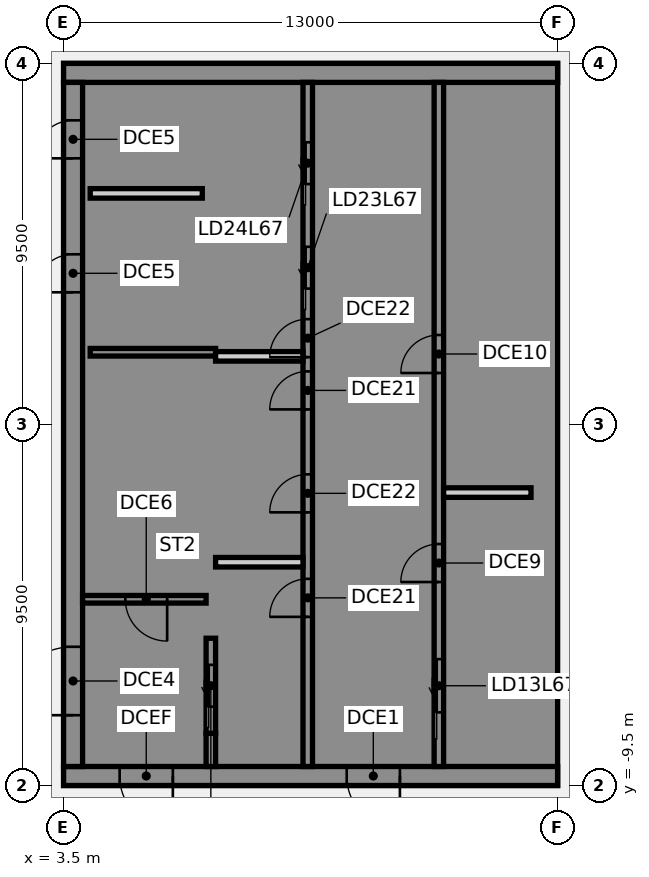
"""IFC4 building model, lengths in metres.
Left out: names, types, materials, properties, quantities, classifications, styles, units other than length and angle.
Written with IfcOpenShell. Run it as: python <this file> out.ifc"""

import sys

from ifc_helpers import new_model, si_unit, direction, frame, frame_2d, origin, place, context, subcontext, project, spatial, polyline, rectangle, outline, extrude, element, fill, save


model = new_model("IFC4")
c1 = context("Model", 3, precision=1e-05, world=origin(), true_north=direction((0.0, 1.0)))
c2 = subcontext(c1, "Body", "Model", "MODEL_VIEW")
j1 = project(units=[si_unit("LENGTHUNIT", "METRE"), si_unit("PLANEANGLEUNIT", "RADIAN")], contexts=[c1])
p1 = place(None, origin())
s1 = spatial("IfcSite", under=j1, at=p1, CompositionType="ELEMENT")
p2 = place(p1, origin())
s2 = spatial("IfcBuilding", under=s1, at=p2, CompositionType="ELEMENT")
p3 = place(p2, frame((0.0, 0.0, 264.0)))
s3 = spatial("IfcBuildingStorey", under=s2, at=p3, CompositionType="ELEMENT", Elevation=264.0)
p4 = place(p3, frame((16.5, -9.25, 0.0), z_axis=(0.0, 0.0, 1.0), x_axis=(-1.0, 0.0, 0.0)))
e1 = element("IfcWall", 1, at=p4, inside=s3, PredefinedType="SHEAR", context=c2, shape_type="SweptSolid", body=[
    extrude(rectangle(XDim=13.0, YDim=0.5, at=frame_2d((6.5, 0.0))), origin(), (0.0, 0.0, 1.0), 3.46),
])
p5 = place(p4, frame((4.15, 0.0, 0.0)))
e2 = element("IfcOpeningElement", 2, at=p5, cuts=e1, PredefinedType="OPENING", context=c2, shape_type="SweptSolid", body=[
    extrude(rectangle(XDim=1.4, YDim=2.1, at=frame_2d((0.7, 1.05))), frame((0.0, 0.26, 0.0), z_axis=(0.0, -1.0, 0.0), x_axis=(1.0, 0.0, 0.0)), (0.0, 0.0, 1.0), 0.52),
])
p6 = place(p4, frame((10.125, 0.0, 0.0)))
e3 = element("IfcOpeningElement", 3, at=p6, cuts=e1, PredefinedType="OPENING", context=c2, shape_type="SweptSolid", body=[
    extrude(rectangle(XDim=1.4, YDim=2.1, at=frame_2d((0.7, 1.05))), frame((0.0, 0.26, 0.0), z_axis=(0.0, -1.0, 0.0), x_axis=(1.0, 0.0, 0.0)), (0.0, 0.0, 1.0), 0.52),
])
p7 = place(p3, origin())
e4 = element("IfcWall", 4, at=p7, inside=s3, PredefinedType="SHEAR", context=c2, shape_type="SweptSolid", body=[
    extrude(outline(polyline([(13.5, -8.125), (13.5, -9.0), (16.0, -9.0), (16.5, -9.0), (16.5, 9.0), (16.0, 9.0), (13.5, 9.0), (13.5, 8.125), (16.0, 8.125), (16.0, 5.625), (13.5, 5.625), (13.5, 5.375), (16.0, 5.375), (16.0, -5.375), (13.5, -5.375), (13.5, -5.625), (16.0, -5.625), (16.0, -8.125), (13.5, -8.125)])), origin(), (0.0, 0.0, 1.0), 3.46),
])
p8 = place(p3, frame((16.5, 9.25, 0.0), z_axis=(0.0, 0.0, 1.0), x_axis=(-1.0, 0.0, 0.0)))
e5 = element("IfcWall", 5, at=p8, inside=s3, PredefinedType="SHEAR", context=c2, shape_type="SweptSolid", body=[
    extrude(rectangle(XDim=13.0, YDim=0.5, at=frame_2d((6.5, 0.0))), origin(), (0.0, 0.0, 1.0), 3.46),
])
p9 = place(p3, origin())
e6 = element("IfcWall", 6, at=p9, inside=s3, PredefinedType="SHEAR", context=c2, shape_type="SweptSolid", body=[
    extrude(outline(polyline([(9.8, -5.375), (7.5, -5.375), (7.5, 2.625), (9.8, 2.625), (9.8, 2.875), (7.5, 2.875), (7.5, 5.375), (9.8, 5.375), (9.8, 5.625), (7.5, 5.625), (7.5, 8.125), (9.8, 8.125), (9.8, 9.0), (7.5, 9.0), (7.25, 9.0), (7.25, -5.625), (7.5, -5.625), (9.8, -5.625), (9.8, -5.375)])), origin(), (0.0, 0.0, 1.0), 3.46),
])
p10 = place(p3, origin())
e7 = element("IfcWall", 7, at=p10, inside=s3, PredefinedType="SHEAR", context=c2, shape_type="SweptSolid", body=[
    extrude(outline(polyline([(7.5, -8.125), (7.5, -9.0), (9.8, -9.0), (9.8, -8.125), (9.8, -5.625), (9.55, -5.625), (9.55, -8.125), (7.5, -8.125)])), origin(), (0.0, 0.0, 1.0), 3.46),
])
p11 = place(p3, frame((7.375, -9.0, 0.0), z_axis=(0.0, 0.0, 1.0), x_axis=(0.0, 1.0, 0.0)))
e8 = element("IfcWall", 8, at=p11, inside=s3, PredefinedType="SHEAR", context=c2, shape_type="SweptSolid", body=[
    extrude(rectangle(XDim=0.875, YDim=0.25, at=frame_2d((0.438, 0.0))), origin(), (0.0, 0.0, 1.0), 3.46),
])
p12 = place(p3, frame((7.5, 1.9, 0.0), z_axis=(0.0, 0.0, 1.0), x_axis=(-1.0, 0.0, 0.0)))
e9 = element("IfcWall", 9, at=p12, inside=s3, PredefinedType="SHEAR", context=c2, shape_type="SweptSolid", body=[
    extrude(rectangle(XDim=3.3, YDim=0.2, at=frame_2d((1.65, 0.0))), origin(), (0.0, 0.0, 1.0), 3.46),
])
p13 = place(p3, frame((13.375, -9.0, 0.0), z_axis=(0.0, 0.0, 1.0), x_axis=(0.0, 1.0, 0.0)))
e10 = element("IfcWall", 10, at=p13, inside=s3, PredefinedType="SHEAR", context=c2, shape_type="SweptSolid", body=[
    extrude(rectangle(XDim=18.0, YDim=0.25, at=frame_2d((9.0, 0.0))), origin(), (0.0, 0.0, 1.0), 3.46),
])
p14 = place(p13, frame((1.425, 0.0, 0.0)))
e11 = element("IfcOpeningElement", 11, at=p14, cuts=e10, PredefinedType="OPENING", context=c2, shape_type="SweptSolid", body=[
    extrude(rectangle(XDim=1.4, YDim=2.1, at=frame_2d((0.7, 1.05))), frame((0.0, 0.135, 0.0), z_axis=(0.0, -1.0, 0.0), x_axis=(1.0, 0.0, 0.0)), (0.0, 0.0, 1.0), 0.27),
])
p15 = place(p13, frame((4.854, 0.0, 0.0)))
e12 = element("IfcOpeningElement", 12, at=p15, cuts=e10, PredefinedType="OPENING", context=c2, shape_type="SweptSolid", body=[
    extrude(rectangle(XDim=1.0, YDim=2.1, at=frame_2d((0.5, 1.05))), frame((0.0, 0.135, 0.0), z_axis=(0.0, -1.0, 0.0), x_axis=(1.0, 0.0, 0.0)), (0.0, 0.0, 1.0), 0.27),
])
p16 = place(p13, frame((10.354, 0.0, 0.0)))
e13 = element("IfcOpeningElement", 13, at=p16, cuts=e10, PredefinedType="OPENING", context=c2, shape_type="SweptSolid", body=[
    extrude(rectangle(XDim=1.0, YDim=2.1, at=frame_2d((0.5, 1.05))), frame((0.0, 0.135, 0.0), z_axis=(0.0, -1.0, 0.0), x_axis=(1.0, 0.0, 0.0)), (0.0, 0.0, 1.0), 0.27),
])
p17 = place(p3, frame((9.925, -9.0, 0.0), z_axis=(0.0, 0.0, 1.0), x_axis=(0.0, 1.0, 0.0)))
e14 = element("IfcWall", 14, at=p17, inside=s3, PredefinedType="SHEAR", context=c2, shape_type="SweptSolid", body=[
    extrude(rectangle(XDim=18.0, YDim=0.25, at=frame_2d((9.0, 0.0))), origin(), (0.0, 0.0, 1.0), 3.46),
])
p18 = place(p17, frame((12.575, 0.0, 0.0)))
e15 = element("IfcOpeningElement", 15, at=p18, cuts=e14, PredefinedType="OPENING", context=c2, shape_type="SweptSolid", body=[
    extrude(rectangle(XDim=1.1, YDim=2.1, at=frame_2d((0.55, 1.05))), frame((0.0, 0.135, 0.0), z_axis=(0.0, -1.0, 0.0), x_axis=(1.0, 0.0, 0.0)), (0.0, 0.0, 1.0), 0.27),
])
p19 = place(p17, frame((15.325, 0.0, 0.0)))
e16 = element("IfcOpeningElement", 16, at=p19, cuts=e14, PredefinedType="OPENING", context=c2, shape_type="SweptSolid", body=[
    extrude(rectangle(XDim=1.1, YDim=2.1, at=frame_2d((0.55, 1.05))), frame((0.0, 0.135, 0.0), z_axis=(0.0, -1.0, 0.0), x_axis=(1.0, 0.0, 0.0)), (0.0, 0.0, 1.0), 0.27),
])
p20 = place(p17, frame((3.938, 0.0, 0.0)))
e17 = element("IfcOpeningElement", 17, at=p20, cuts=e14, PredefinedType="OPENING", context=c2, shape_type="SweptSolid", body=[
    extrude(rectangle(XDim=1.0, YDim=2.1, at=frame_2d((0.5, 1.05))), frame((0.0, 0.135, 0.0), z_axis=(0.0, -1.0, 0.0), x_axis=(1.0, 0.0, 0.0)), (0.0, 0.0, 1.0), 0.27),
])
p21 = place(p17, frame((6.688, 0.0, 0.0)))
e18 = element("IfcOpeningElement", 18, at=p21, cuts=e14, PredefinedType="OPENING", context=c2, shape_type="SweptSolid", body=[
    extrude(rectangle(XDim=1.0, YDim=2.1, at=frame_2d((0.5, 1.05))), frame((0.0, 0.135, 0.0), z_axis=(0.0, -1.0, 0.0), x_axis=(1.0, 0.0, 0.0)), (0.0, 0.0, 1.0), 0.27),
])
p22 = place(p17, frame((9.396, 0.0, 0.0)))
e19 = element("IfcOpeningElement", 19, at=p22, cuts=e14, PredefinedType="OPENING", context=c2, shape_type="SweptSolid", body=[
    extrude(rectangle(XDim=1.0, YDim=2.1, at=frame_2d((0.5, 1.05))), frame((0.0, 0.135, 0.0), z_axis=(0.0, -1.0, 0.0), x_axis=(1.0, 0.0, 0.0)), (0.0, 0.0, 1.0), 0.27),
])
p23 = place(p17, frame((10.771, 0.0, 0.0)))
e20 = element("IfcOpeningElement", 20, at=p23, cuts=e14, PredefinedType="OPENING", context=c2, shape_type="SweptSolid", body=[
    extrude(rectangle(XDim=1.0, YDim=2.1, at=frame_2d((0.5, 1.05))), frame((0.0, 0.135, 0.0), z_axis=(0.0, -1.0, 0.0), x_axis=(1.0, 0.0, 0.0)), (0.0, 0.0, 1.0), 0.27),
])
p24 = place(p3, frame((7.375, -8.125, 0.0), z_axis=(0.0, 0.0, 1.0), x_axis=(0.0, 1.0, 0.0)))
e21 = element("IfcWall", 21, at=p24, inside=s3, PredefinedType="SHEAR", context=c2, shape_type="SweptSolid", body=[
    extrude(rectangle(XDim=2.5, YDim=0.25, at=frame_2d((1.25, 0.0))), origin(), (0.0, 0.0, 1.0), 3.46),
])
p25 = place(p24, frame((0.7, 0.0, 0.0)))
e22 = element("IfcOpeningElement", 22, at=p25, cuts=e21, PredefinedType="OPENING", context=c2, shape_type="SweptSolid", body=[
    extrude(rectangle(XDim=1.1, YDim=2.1, at=frame_2d((0.55, 1.05))), frame((0.0, 0.135, 0.0), z_axis=(0.0, -1.0, 0.0), x_axis=(1.0, 0.0, 0.0)), (0.0, 0.0, 1.0), 0.27),
])
p26 = place(p3, frame((3.75, -9.0, 0.0), z_axis=(0.0, 0.0, 1.0), x_axis=(0.0, 1.0, 0.0)))
e23 = element("IfcWall", 23, at=p26, inside=s3, PredefinedType="SHEAR", context=c2, shape_type="SweptSolid", body=[
    extrude(rectangle(XDim=18.0, YDim=0.5, at=frame_2d((9.0, 0.0))), origin(), (0.0, 0.0, 1.0), 3.46),
])
p27 = place(p26, frame((1.35, 0.0, 0.0)))
e24 = element("IfcOpeningElement", 24, at=p27, cuts=e23, PredefinedType="OPENING", context=c2, shape_type="SweptSolid", body=[
    extrude(rectangle(XDim=1.8, YDim=2.1, at=frame_2d((0.9, 1.05))), frame((0.0, 0.26, 0.0), z_axis=(0.0, -1.0, 0.0), x_axis=(1.0, 0.0, 0.0)), (0.0, 0.0, 1.0), 0.52),
])
p28 = place(p26, frame((12.478, 0.0, 0.0)))
e25 = element("IfcOpeningElement", 25, at=p28, cuts=e23, PredefinedType="OPENING", context=c2, shape_type="SweptSolid", body=[
    extrude(rectangle(XDim=1.0, YDim=2.1, at=frame_2d((0.5, 1.05))), frame((0.0, 0.26, 0.0), z_axis=(0.0, -1.0, 0.0), x_axis=(1.0, 0.0, 0.0)), (0.0, 0.0, 1.0), 0.52),
])
p29 = place(p26, frame((16.002, 0.0, 0.0)))
e26 = element("IfcOpeningElement", 26, at=p29, cuts=e23, PredefinedType="OPENING", context=c2, shape_type="SweptSolid", body=[
    extrude(rectangle(XDim=1.0, YDim=2.1, at=frame_2d((0.5, 1.05))), frame((0.0, 0.26, 0.0), z_axis=(0.0, -1.0, 0.0), x_axis=(1.0, 0.0, 0.0)), (0.0, 0.0, 1.0), 0.52),
])
p30 = place(p3, frame((7.15, 6.08, 0.0), z_axis=(0.0, 0.0, 1.0), x_axis=(-1.0, 0.0, 0.0)))
e27 = element("IfcWall", 27, at=p30, inside=s3, PredefinedType="PARTITIONING", context=c2, shape_type="SweptSolid", body=[
    extrude(rectangle(XDim=2.95, YDim=0.25, at=frame_2d((1.475, 0.0))), origin(), (0.0, 0.0, 1.0), 3.46),
])
p31 = place(p3, frame((7.25, -4.6, 0.0), z_axis=(0.0, 0.0, 1.0), x_axis=(-1.0, 0.0, 0.0)))
e28 = element("IfcWall", 28, at=p31, inside=s3, PredefinedType="SHEAR", context=c2, shape_type="SweptSolid", body=[
    extrude(rectangle(XDim=3.25, YDim=0.2, at=frame_2d((1.625, 0.0))), origin(), (0.0, 0.0, 1.0), 3.46),
])
p32 = place(p31, frame((1.025, 0.0, 0.0)))
e29 = element("IfcOpeningElement", 29, at=p32, cuts=e28, PredefinedType="OPENING", context=c2, shape_type="SweptSolid", body=[
    extrude(rectangle(XDim=1.1, YDim=2.1, at=frame_2d((0.55, 1.05))), frame((0.0, 0.11, 0.0), z_axis=(0.0, -1.0, 0.0), x_axis=(1.0, 0.0, 0.0)), (0.0, 0.0, 1.0), 0.22),
])
for number, where, z_axis, x_axis in (
    (30, (15.8, -1.792, 0.0), (0.0, 0.0, 1.0), (-1.0, 0.0, 0.0)),
    (31, (9.8, -3.625, 0.0), (0.0, 0.0, 1.0), (-1.0, 0.0, 0.0)),
    (32, (9.8, 1.792, 0.0), (0.0, 0.0, 1.0), (-1.0, 0.0, 0.0)),
):
    element("IfcWall", number, at=place(p3, frame(where, z_axis=z_axis, x_axis=x_axis)), inside=s3, PredefinedType="PARTITIONING", context=c2, shape_type="SweptSolid", body=[
        extrude(rectangle(XDim=2.3, YDim=0.25, at=frame_2d((1.15, 0.0))), origin(), (0.0, 0.0, 1.0), 3.46),
    ])
p33 = place(p5, origin())
e33 = element("IfcDoor", 33, at=p33, inside=s3, OperationType="SINGLE_SWING_LEFT", PredefinedType="DOOR", context=c2, shape_type="SweptSolid", body=[
    extrude(rectangle(XDim=1.4, YDim=2.1, at=frame_2d((0.7, 1.05))), frame((0.0, 0.025, 0.0), z_axis=(0.0, -1.0, 0.0), x_axis=(1.0, 0.0, 0.0)), (0.0, 0.0, 1.0), 0.05),
])
fill(e2, e33)
p34 = place(p6, origin())
e34 = element("IfcDoor", 34, at=p34, inside=s3, OperationType="SINGLE_SWING_LEFT", PredefinedType="DOOR", context=c2, shape_type="SweptSolid", body=[
    extrude(rectangle(XDim=1.4, YDim=2.1, at=frame_2d((0.7, 1.05))), frame((0.0, 0.025, 0.0), z_axis=(0.0, -1.0, 0.0), x_axis=(1.0, 0.0, 0.0)), (0.0, 0.0, 1.0), 0.05),
])
fill(e3, e34)
p35 = place(p27, origin())
e35 = element("IfcDoor", 35, at=p35, inside=s3, OperationType="SINGLE_SWING_LEFT", PredefinedType="DOOR", context=c2, shape_type="SweptSolid", body=[
    extrude(rectangle(XDim=1.8, YDim=2.1, at=frame_2d((0.9, 1.05))), frame((0.0, 0.025, 0.0), z_axis=(0.0, -1.0, 0.0), x_axis=(1.0, 0.0, 0.0)), (0.0, 0.0, 1.0), 0.05),
])
fill(e24, e35)
p36 = place(p28, origin())
e36 = element("IfcDoor", 36, at=p36, inside=s3, OperationType="SINGLE_SWING_LEFT", PredefinedType="DOOR", context=c2, shape_type="SweptSolid", body=[
    extrude(rectangle(XDim=1.0, YDim=2.1, at=frame_2d((0.5, 1.05))), frame((0.0, -0.175, 0.0), z_axis=(0.0, -1.0, 0.0), x_axis=(1.0, 0.0, 0.0)), (0.0, 0.0, 1.0), 0.05),
])
fill(e25, e36)
p37 = place(p29, origin())
e37 = element("IfcDoor", 37, at=p37, inside=s3, OperationType="SINGLE_SWING_LEFT", PredefinedType="DOOR", context=c2, shape_type="SweptSolid", body=[
    extrude(rectangle(XDim=1.0, YDim=2.1, at=frame_2d((0.5, 1.05))), frame((0.0, -0.175, 0.0), z_axis=(0.0, -1.0, 0.0), x_axis=(1.0, 0.0, 0.0)), (0.0, 0.0, 1.0), 0.05),
])
fill(e26, e37)
p38 = place(p32, origin())
e38 = element("IfcDoor", 38, at=p38, inside=s3, OperationType="SINGLE_SWING_LEFT", PredefinedType="DOOR", context=c2, shape_type="SweptSolid", body=[
    extrude(rectangle(XDim=1.1, YDim=2.1, at=frame_2d((0.55, 1.05))), frame((0.0, 0.025, 0.0), z_axis=(0.0, -1.0, 0.0), x_axis=(1.0, 0.0, 0.0)), (0.0, 0.0, 1.0), 0.05),
])
fill(e29, e38)
p39 = place(p14, origin())
e39 = element("IfcDoor", 39, at=p39, inside=s3, OperationType="SLIDING_TO_LEFT", PredefinedType="DOOR", context=c2, shape_type="SweptSolid", body=[
    extrude(rectangle(XDim=1.4, YDim=2.1, at=frame_2d((0.7, 1.05))), frame((0.0, 0.025, 0.0), z_axis=(0.0, -1.0, 0.0), x_axis=(1.0, 0.0, 0.0)), (0.0, 0.0, 1.0), 0.05),
])
fill(e11, e39)
p40 = place(p25, origin())
e40 = element("IfcDoor", 40, at=p40, inside=s3, OperationType="SLIDING_TO_LEFT", PredefinedType="DOOR", context=c2, shape_type="SweptSolid", body=[
    extrude(rectangle(XDim=1.1, YDim=2.1, at=frame_2d((0.55, 1.05))), frame((0.0, 0.025, 0.0), z_axis=(0.0, -1.0, 0.0), x_axis=(1.0, 0.0, 0.0)), (0.0, 0.0, 1.0), 0.05),
])
fill(e22, e40)
p41 = place(p18, origin())
e41 = element("IfcDoor", 41, at=p41, inside=s3, OperationType="SLIDING_TO_LEFT", PredefinedType="DOOR", context=c2, shape_type="SweptSolid", body=[
    extrude(rectangle(XDim=1.1, YDim=2.1, at=frame_2d((0.55, 1.05))), frame((0.0, 0.025, 0.0), z_axis=(0.0, -1.0, 0.0), x_axis=(1.0, 0.0, 0.0)), (0.0, 0.0, 1.0), 0.05),
])
fill(e15, e41)
p42 = place(p19, origin())
e42 = element("IfcDoor", 42, at=p42, inside=s3, OperationType="SLIDING_TO_LEFT", PredefinedType="DOOR", context=c2, shape_type="SweptSolid", body=[
    extrude(rectangle(XDim=1.1, YDim=2.1, at=frame_2d((0.55, 1.05))), frame((0.0, 0.025, 0.0), z_axis=(0.0, -1.0, 0.0), x_axis=(1.0, 0.0, 0.0)), (0.0, 0.0, 1.0), 0.05),
])
fill(e16, e42)
p43 = place(p15, origin())
e43 = element("IfcDoor", 43, at=p43, inside=s3, OperationType="SINGLE_SWING_LEFT", PredefinedType="DOOR", context=c2, shape_type="SweptSolid", body=[
    extrude(rectangle(XDim=1.0, YDim=2.1, at=frame_2d((0.5, 1.05))), frame((0.0, 0.025, 0.0), z_axis=(0.0, -1.0, 0.0), x_axis=(1.0, 0.0, 0.0)), (0.0, 0.0, 1.0), 0.05),
])
fill(e12, e43)
p44 = place(p16, origin())
e44 = element("IfcDoor", 44, at=p44, inside=s3, OperationType="SINGLE_SWING_LEFT", PredefinedType="DOOR", context=c2, shape_type="SweptSolid", body=[
    extrude(rectangle(XDim=1.0, YDim=2.1, at=frame_2d((0.5, 1.05))), frame((0.0, 0.025, 0.0), z_axis=(0.0, -1.0, 0.0), x_axis=(1.0, 0.0, 0.0)), (0.0, 0.0, 1.0), 0.05),
])
fill(e13, e44)
p45 = place(p20, origin())
e45 = element("IfcDoor", 45, at=p45, inside=s3, OperationType="SINGLE_SWING_LEFT", PredefinedType="DOOR", context=c2, shape_type="SweptSolid", body=[
    extrude(rectangle(XDim=1.0, YDim=2.1, at=frame_2d((0.5, 1.05))), frame((0.0, 0.025, 0.0), z_axis=(0.0, -1.0, 0.0), x_axis=(1.0, 0.0, 0.0)), (0.0, 0.0, 1.0), 0.05),
])
fill(e17, e45)
p46 = place(p21, origin())
e46 = element("IfcDoor", 46, at=p46, inside=s3, OperationType="SINGLE_SWING_LEFT", PredefinedType="DOOR", context=c2, shape_type="SweptSolid", body=[
    extrude(rectangle(XDim=1.0, YDim=2.1, at=frame_2d((0.5, 1.05))), frame((0.0, 0.025, 0.0), z_axis=(0.0, -1.0, 0.0), x_axis=(1.0, 0.0, 0.0)), (0.0, 0.0, 1.0), 0.05),
])
fill(e18, e46)
p47 = place(p22, origin())
e47 = element("IfcDoor", 47, at=p47, inside=s3, OperationType="SINGLE_SWING_LEFT", PredefinedType="DOOR", context=c2, shape_type="SweptSolid", body=[
    extrude(rectangle(XDim=1.0, YDim=2.1, at=frame_2d((0.5, 1.05))), frame((0.0, 0.025, 0.0), z_axis=(0.0, -1.0, 0.0), x_axis=(1.0, 0.0, 0.0)), (0.0, 0.0, 1.0), 0.05),
])
fill(e19, e47)
p48 = place(p23, origin())
e48 = element("IfcDoor", 48, at=p48, inside=s3, OperationType="SINGLE_SWING_LEFT", PredefinedType="DOOR", context=c2, shape_type="SweptSolid", body=[
    extrude(rectangle(XDim=1.0, YDim=2.1, at=frame_2d((0.5, 1.05))), frame((0.0, 0.025, 0.0), z_axis=(0.0, -1.0, 0.0), x_axis=(1.0, 0.0, 0.0)), (0.0, 0.0, 1.0), 0.05),
])
fill(e20, e48)
save(model, sys.argv[1])
